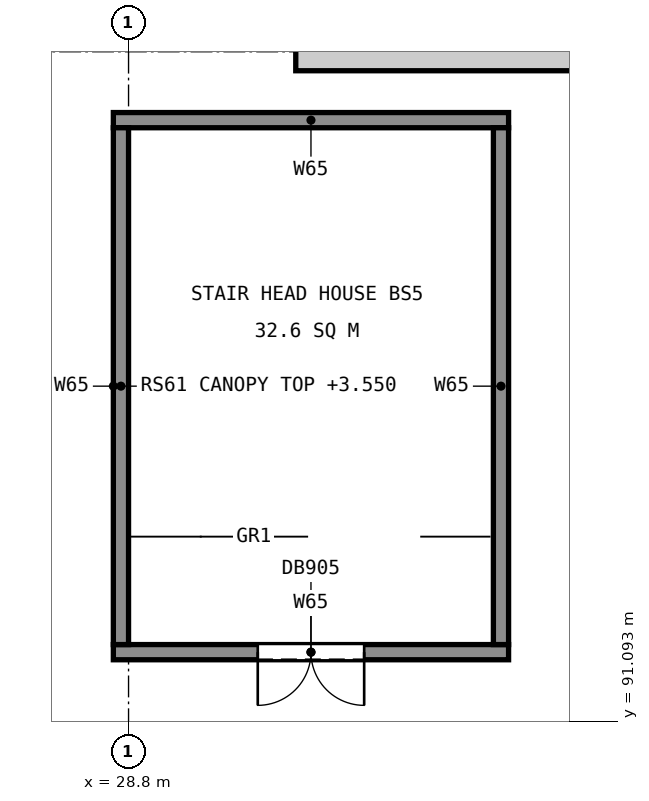
"""IFC4 building model, lengths in metres.
Left out: names, types, materials, properties, quantities, classifications, styles, units other than length and angle.
Written with IfcOpenShell. Run it as: python <this file> out.ifc"""

import sys

from ifc_helpers import new_model, si_unit, direction, frame, frame_2d, origin, place, context, subcontext, project, spatial, rectangle, extrude, element, fill, save


model = new_model("IFC4")
c1 = context("Model", 3, precision=1e-05, world=origin(), true_north=direction((0.0, 1.0)))
c2 = subcontext(c1, "Body", "Model", "MODEL_VIEW")
j1 = project(units=[si_unit("LENGTHUNIT", "METRE"), si_unit("PLANEANGLEUNIT", "RADIAN")], contexts=[c1])
p1 = place(None, origin())
s1 = spatial("IfcSite", under=j1, at=p1, CompositionType="ELEMENT")
p2 = place(p1, origin())
s2 = spatial("IfcBuilding", under=s1, at=p2, CompositionType="ELEMENT")
p3 = place(p2, origin())
s3 = spatial("IfcBuildingStorey", under=s2, at=p3, CompositionType="ELEMENT", Elevation=0.0)
p4 = place(p3, frame((31.0, 99.8, 0.0), z_axis=(0.0, 0.0, 1.0), x_axis=(1.0, 0.0, 0.0)))
e1 = element("IfcWall", 1, at=p4, inside=s3, PredefinedType="SOLIDWALL", context=c2, shape_type="SweptSolid", body=[
    extrude(rectangle(XDim=8.0, YDim=0.3, at=frame_2d((4.0, 0.0))), origin(), (0.0, 0.0, 1.0), 0.6),
])
p5 = place(p3, frame((28.6, 92.0, 0.0), z_axis=(0.0, 0.0, 1.0), x_axis=(1.0, 0.0, 0.0)))
e2 = element("IfcWall", 2, at=p5, inside=s3, PredefinedType="SOLIDWALL", context=c2, shape_type="SweptSolid", body=[
    extrude(rectangle(XDim=5.2, YDim=0.2, at=frame_2d((2.6, 0.0))), origin(), (0.0, 0.0, 1.0), 3.3),
])
p6 = place(p5, frame((1.9, 0.0, 0.0)))
e3 = element("IfcOpeningElement", 3, at=p6, cuts=e2, PredefinedType="OPENING", context=c2, shape_type="SweptSolid", body=[
    extrude(rectangle(XDim=1.4, YDim=2.1, at=frame_2d((0.7, 1.05))), frame((0.0, 0.11, 0.0), z_axis=(0.0, -1.0, 0.0), x_axis=(1.0, 0.0, 0.0)), (0.0, 0.0, 1.0), 0.22),
])
p7 = place(p3, frame((28.6, 99.0, 0.0), z_axis=(0.0, 0.0, 1.0), x_axis=(1.0, 0.0, 0.0)))
e4 = element("IfcWall", 4, at=p7, inside=s3, PredefinedType="SOLIDWALL", context=c2, shape_type="SweptSolid", body=[
    extrude(rectangle(XDim=5.2, YDim=0.2, at=frame_2d((2.6, 0.0))), origin(), (0.0, 0.0, 1.0), 3.3),
])
for number, where, z_axis, x_axis in (
    (5, (28.7, 92.1, 0.0), (0.0, 0.0, 1.0), (0.0, 1.0, 0.0)),
    (6, (33.7, 92.1, 0.0), (0.0, 0.0, 1.0), (0.0, 1.0, 0.0)),
):
    element("IfcWall", number, at=place(p3, frame(where, z_axis=z_axis, x_axis=x_axis)), inside=s3, PredefinedType="SOLIDWALL", context=c2, shape_type="SweptSolid", body=[
        extrude(rectangle(XDim=6.8, YDim=0.2, at=frame_2d((3.4, 0.0))), origin(), (0.0, 0.0, 1.0), 3.3),
    ])
p8 = place(p6, frame((1.4, 0.0, 0.0), z_axis=(0.0, 0.0, 1.0), x_axis=(-1.0, 0.0, 0.0)))
e7 = element("IfcDoor", 7, at=p8, inside=s3, OperationType="DOUBLE_DOOR_SINGLE_SWING", PredefinedType="DOOR", context=c2, shape_type="SweptSolid", body=[
    extrude(rectangle(XDim=1.4, YDim=2.1, at=frame_2d((0.7, 1.05))), frame((0.0, 0.025, 0.0), z_axis=(0.0, -1.0, 0.0), x_axis=(1.0, 0.0, 0.0)), (0.0, 0.0, 1.0), 0.05),
])
fill(e3, e7)
save(model, sys.argv[1])
